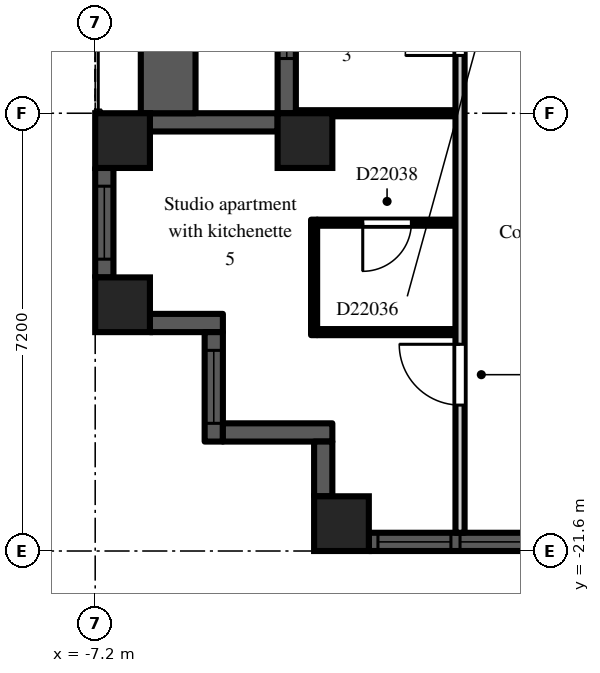
"""IFC4 building model, lengths in metres.
Left out: names, types, materials, properties, quantities, classifications, styles, units other than length and angle.
Written with IfcOpenShell. Run it as: python <this file> out.ifc"""

import sys

from ifc_helpers import new_model, si_unit, direction, frame, frame_2d, origin, origin_2d, place, context, subcontext, project, spatial, rectangle, extrude, element, fill, save


model = new_model("IFC4")
c1 = context("Model", 3, precision=1e-05, world=origin(), true_north=direction((0.0, 1.0)))
c2 = subcontext(c1, "Body", "Model", "MODEL_VIEW")
j1 = project(units=[si_unit("LENGTHUNIT", "METRE"), si_unit("PLANEANGLEUNIT", "RADIAN")], contexts=[c1])
p1 = place(None, origin())
s1 = spatial("IfcSite", under=j1, at=p1, CompositionType="ELEMENT")
p2 = place(p1, origin())
s2 = spatial("IfcBuilding", under=s1, at=p2, CompositionType="ELEMENT")
p3 = place(p2, frame((0.0, 0.0, 156.3)))
s3 = spatial("IfcBuildingStorey", under=s2, at=p3, CompositionType="ELEMENT", Elevation=156.3)
for number, where, z_axis, x_axis in (
    (1, (-6.75, -17.55, 0.0), (0.0, 0.0, 1.0), (1.0, 0.0, 0.0)),
    (2, (-6.75, -14.85, 0.0), (0.0, 0.0, 1.0), (1.0, 0.0, 0.0)),
    (3, (-3.75, -14.85, 0.0), (0.0, 0.0, 1.0), (1.0, 0.0, 0.0)),
    (4, (-3.15, -21.15, 0.0), (0.0, 0.0, 1.0), (1.0, 0.0, 0.0)),
):
    element("IfcColumn", number, at=place(p3, frame(where, z_axis=z_axis, x_axis=x_axis)), inside=s3, PredefinedType="COLUMN", context=c2, shape_type="SweptSolid", body=[
        extrude(rectangle(XDim=0.9, YDim=0.9, at=origin_2d()), origin(), (0.0, 0.0, 1.0), 3.0),
    ])
p4 = place(p3, frame((-4.05, -7.2, 0.0), z_axis=(0.0, 0.0, 1.0), x_axis=(0.0, -1.0, 0.0)))
e5 = element("IfcWall", 5, at=p4, inside=s3, PredefinedType="SOLIDWALL", context=c2, shape_type="SweptSolid", body=[
    extrude(rectangle(XDim=7.2, YDim=0.3, at=frame_2d((3.6, 0.0))), origin(), (0.0, 0.0, 1.0), 2.2),
])
p5 = place(p4, frame((3.0, 0.0, 0.0)))
e6 = element("IfcOpeningElement", 6, at=p5, cuts=e5, PredefinedType="OPENING", context=c2, shape_type="SweptSolid", body=[
    extrude(rectangle(XDim=1.2, YDim=2.05, at=frame_2d((0.6, 1.025))), frame((0.0, 0.16, 0.0), z_axis=(0.0, -1.0, 0.0), x_axis=(1.0, 0.0, 0.0)), (0.0, 0.0, 1.0), 0.32),
])
p6 = place(p4, frame((0.9, 0.0, 0.2)))
e7 = element("IfcOpeningElement", 7, at=p6, cuts=e5, PredefinedType="OPENING", context=c2, shape_type="SweptSolid", body=[
    extrude(rectangle(XDim=1.8, YDim=1.85, at=frame_2d((0.9, 0.925))), frame((0.0, 0.16, 0.0), z_axis=(0.0, -1.0, 0.0), x_axis=(1.0, 0.0, 0.0)), (0.0, 0.0, 1.0), 0.32),
])
p7 = place(p4, frame((4.5, 0.0, 0.2)))
e8 = element("IfcOpeningElement", 8, at=p7, cuts=e5, PredefinedType="OPENING", context=c2, shape_type="SweptSolid", body=[
    extrude(rectangle(XDim=1.8, YDim=1.85, at=frame_2d((0.9, 0.925))), frame((0.0, 0.16, 0.0), z_axis=(0.0, -1.0, 0.0), x_axis=(1.0, 0.0, 0.0)), (0.0, 0.0, 1.0), 0.32),
])
p8 = place(p3, frame((-4.2, -14.55, 0.0), z_axis=(0.0, 0.0, 1.0), x_axis=(-1.0, 0.0, 0.0)))
e9 = element("IfcWall", 9, at=p8, inside=s3, PredefinedType="SOLIDWALL", context=c2, shape_type="SweptSolid", body=[
    extrude(rectangle(XDim=2.1, YDim=0.3, at=frame_2d((1.05, 0.0))), origin(), (0.0, 0.0, 1.0), 2.2),
])
p9 = place(p3, frame((-7.05, -15.3, 0.0), z_axis=(0.0, 0.0, 1.0), x_axis=(0.0, -1.0, 0.0)))
e10 = element("IfcWall", 10, at=p9, inside=s3, PredefinedType="SOLIDWALL", context=c2, shape_type="SweptSolid", body=[
    extrude(rectangle(XDim=1.8, YDim=0.3, at=frame_2d((0.9, 0.0))), origin(), (0.0, 0.0, 1.0), 2.2),
])
p10 = place(p9, frame((0.3, 0.0, 0.2)))
e11 = element("IfcOpeningElement", 11, at=p10, cuts=e10, PredefinedType="OPENING", context=c2, shape_type="SweptSolid", body=[
    extrude(rectangle(XDim=1.2, YDim=1.85, at=frame_2d((0.6, 0.925))), frame((0.0, 0.16, 0.0), z_axis=(0.0, -1.0, 0.0), x_axis=(1.0, 0.0, 0.0)), (0.0, 0.0, 1.0), 0.32),
])
p11 = place(p3, frame((-6.3, -17.85, 0.0), z_axis=(0.0, 0.0, 1.0), x_axis=(1.0, 0.0, 0.0)))
e12 = element("IfcWall", 12, at=p11, inside=s3, PredefinedType="SOLIDWALL", context=c2, shape_type="SweptSolid", body=[
    extrude(rectangle(XDim=1.2, YDim=0.3, at=frame_2d((0.6, 0.0))), origin(), (0.0, 0.0, 1.0), 2.6),
])
p12 = place(p3, frame((-5.25, -18.0, 0.0), z_axis=(0.0, 0.0, 1.0), x_axis=(0.0, -1.0, 0.0)))
e13 = element("IfcWall", 13, at=p12, inside=s3, PredefinedType="SOLIDWALL", context=c2, shape_type="SweptSolid", body=[
    extrude(rectangle(XDim=1.8, YDim=0.3, at=frame_2d((0.9, 0.0))), origin(), (0.0, 0.0, 1.0), 2.6),
])
p13 = place(p12, frame((0.3, 0.0, 0.2)))
e14 = element("IfcOpeningElement", 14, at=p13, cuts=e13, PredefinedType="OPENING", context=c2, shape_type="SweptSolid", body=[
    extrude(rectangle(XDim=1.2, YDim=1.85, at=frame_2d((0.6, 0.925))), frame((0.0, 0.16, 0.0), z_axis=(0.0, -1.0, 0.0), x_axis=(1.0, 0.0, 0.0)), (0.0, 0.0, 1.0), 0.32),
])
p14 = place(p3, frame((-5.1, -19.65, 0.0), z_axis=(0.0, 0.0, 1.0), x_axis=(1.0, 0.0, 0.0)))
e15 = element("IfcWall", 15, at=p14, inside=s3, PredefinedType="SOLIDWALL", context=c2, shape_type="SweptSolid", body=[
    extrude(rectangle(XDim=1.8, YDim=0.3, at=frame_2d((0.9, 0.0))), origin(), (0.0, 0.0, 1.0), 2.6),
])
p15 = place(p3, frame((-3.45, -19.8, 0.0), z_axis=(0.0, 0.0, 1.0), x_axis=(0.0, -1.0, 0.0)))
e16 = element("IfcWall", 16, at=p15, inside=s3, PredefinedType="SOLIDWALL", context=c2, shape_type="SweptSolid", body=[
    extrude(rectangle(XDim=0.9, YDim=0.3, at=frame_2d((0.45, 0.0))), origin(), (0.0, 0.0, 1.0), 2.6),
])
p16 = place(p3, frame((-2.7, -21.45, 0.0), z_axis=(0.0, 0.0, 1.0), x_axis=(1.0, 0.0, 0.0)))
e17 = element("IfcWall", 17, at=p16, inside=s3, PredefinedType="SOLIDWALL", context=c2, shape_type="SweptSolid", body=[
    extrude(rectangle(XDim=5.4, YDim=0.3, at=frame_2d((2.7, 0.0))), origin(), (0.0, 0.0, 1.0), 2.2),
])
p17 = place(p16, frame((1.5, 0.0, 0.2)))
e18 = element("IfcOpeningElement", 18, at=p17, cuts=e17, PredefinedType="OPENING", context=c2, shape_type="SweptSolid", body=[
    extrude(rectangle(XDim=2.4, YDim=1.85, at=frame_2d((1.2, 0.925))), frame((0.0, 0.16, 0.0), z_axis=(0.0, -1.0, 0.0), x_axis=(1.0, 0.0, 0.0)), (0.0, 0.0, 1.0), 0.32),
])
p18 = place(p16, frame((0.15, 0.0, 0.2)))
e19 = element("IfcOpeningElement", 19, at=p18, cuts=e17, PredefinedType="OPENING", context=c2, shape_type="SweptSolid", body=[
    extrude(rectangle(XDim=1.2, YDim=1.85, at=frame_2d((0.6, 0.925))), frame((0.0, 0.16, 0.0), z_axis=(0.0, -1.0, 0.0), x_axis=(1.0, 0.0, 0.0)), (0.0, 0.0, 1.0), 0.32),
])
p19 = place(p16, frame((4.05, 0.0, 0.2)))
e20 = element("IfcOpeningElement", 20, at=p19, cuts=e17, PredefinedType="OPENING", context=c2, shape_type="SweptSolid", body=[
    extrude(rectangle(XDim=1.2, YDim=1.85, at=frame_2d((0.6, 0.925))), frame((0.0, 0.16, 0.0), z_axis=(0.0, -1.0, 0.0), x_axis=(1.0, 0.0, 0.0)), (0.0, 0.0, 1.0), 0.32),
])
p20 = place(p3, frame((-6.0, -14.4, 0.0), z_axis=(0.0, 0.0, 1.0), x_axis=(0.0, 1.0, 0.0)))
e21 = element("IfcWall", 21, at=p20, inside=s3, PredefinedType="PARAPET", context=c2, shape_type="SweptSolid", body=[
    extrude(rectangle(XDim=7.2, YDim=0.9, at=frame_2d((3.6, 0.0))), origin(), (0.0, 0.0, 1.0), 0.8),
])
p21 = place(p3, frame((-3.9, -14.4, 0.0), z_axis=(0.0, 0.0, 1.0), x_axis=(1.0, 0.0, 0.0)))
e22 = element("IfcWall", 22, at=p21, inside=s3, PredefinedType="PARTITIONING", context=c2, shape_type="SweptSolid", body=[
    extrude(rectangle(XDim=2.625, YDim=0.1, at=frame_2d((1.312, 0.0))), origin(), (0.0, 0.0, 1.0), 2.6),
])
p22 = place(p3, frame((-3.6, -18.05, 0.0), z_axis=(0.0, 0.0, 1.0), x_axis=(0.0, 1.0, 0.0)))
e23 = element("IfcWall", 23, at=p22, inside=s3, PredefinedType="PARTITIONING", context=c2, shape_type="SweptSolid", body=[
    extrude(rectangle(XDim=1.9, YDim=0.1, at=frame_2d((0.95, 0.0))), origin(), (0.0, 0.0, 1.0), 2.6),
])
p23 = place(p3, frame((-3.55, -18.0, 0.0), z_axis=(0.0, 0.0, 1.0), x_axis=(1.0, 0.0, 0.0)))
e24 = element("IfcWall", 24, at=p23, inside=s3, PredefinedType="PARTITIONING", context=c2, shape_type="SweptSolid", body=[
    extrude(rectangle(XDim=2.275, YDim=0.1, at=frame_2d((1.138, 0.0))), origin(), (0.0, 0.0, 1.0), 2.6),
])
p24 = place(p3, frame((-3.55, -16.2, 0.0), z_axis=(0.0, 0.0, 1.0), x_axis=(1.0, 0.0, 0.0)))
e25 = element("IfcWall", 25, at=p24, inside=s3, PredefinedType="PARTITIONING", context=c2, shape_type="SweptSolid", body=[
    extrude(rectangle(XDim=2.275, YDim=0.1, at=frame_2d((1.138, 0.0))), origin(), (0.0, 0.0, 1.0), 2.6),
])
p25 = place(p24, frame((0.75, 0.0, 0.0)))
e26 = element("IfcOpeningElement", 26, at=p25, cuts=e25, PredefinedType="OPENING", context=c2, shape_type="SweptSolid", body=[
    extrude(rectangle(XDim=0.8, YDim=2.1, at=frame_2d((0.4, 1.05))), frame((0.0, 0.06, 0.0), z_axis=(0.0, -1.0, 0.0), x_axis=(1.0, 0.0, 0.0)), (0.0, 0.0, 1.0), 0.12),
])
p26 = place(p3, frame((-1.2, -21.3, 0.0), z_axis=(0.0, 0.0, 1.0), x_axis=(0.0, 1.0, 0.0)))
e27 = element("IfcWall", 27, at=p26, inside=s3, PredefinedType="PARTITIONING", context=c2, shape_type="SweptSolid", body=[
    extrude(rectangle(XDim=14.025, YDim=0.15, at=frame_2d((7.013, 0.0))), origin(), (0.0, 0.0, 1.0), 2.6),
])
p27 = place(p26, frame((7.85, 0.0, 0.0)))
e28 = element("IfcOpeningElement", 28, at=p27, cuts=e27, PredefinedType="OPENING", context=c2, shape_type="SweptSolid", body=[
    extrude(rectangle(XDim=0.9, YDim=2.1, at=frame_2d((0.45, 1.05))), frame((0.0, 0.085, 0.0), z_axis=(0.0, -1.0, 0.0), x_axis=(1.0, 0.0, 0.0)), (0.0, 0.0, 1.0), 0.17),
])
p28 = place(p26, frame((11.45, 0.0, 0.0)))
e29 = element("IfcOpeningElement", 29, at=p28, cuts=e27, PredefinedType="OPENING", context=c2, shape_type="SweptSolid", body=[
    extrude(rectangle(XDim=0.9, YDim=2.1, at=frame_2d((0.45, 1.05))), frame((0.0, 0.085, 0.0), z_axis=(0.0, -1.0, 0.0), x_axis=(1.0, 0.0, 0.0)), (0.0, 0.0, 1.0), 0.17),
])
p29 = place(p26, frame((2.1, 0.0, 0.0)))
e30 = element("IfcOpeningElement", 30, at=p29, cuts=e27, PredefinedType="OPENING", context=c2, shape_type="SweptSolid", body=[
    extrude(rectangle(XDim=1.0, YDim=2.1, at=frame_2d((0.5, 1.05))), frame((0.0, 0.085, 0.0), z_axis=(0.0, -1.0, 0.0), x_axis=(1.0, 0.0, 0.0)), (0.0, 0.0, 1.0), 0.17),
])
p30 = place(p7, origin())
e31 = element("IfcWindow", 31, at=p30, inside=s3, PartitioningType="SINGLE_PANEL", PredefinedType="WINDOW", context=c2, shape_type="SweptSolid", body=[
    extrude(rectangle(XDim=1.8, YDim=1.85, at=frame_2d((0.9, 0.925))), frame((0.0, 0.03, 0.0), z_axis=(0.0, -1.0, 0.0), x_axis=(1.0, 0.0, 0.0)), (0.0, 0.0, 1.0), 0.06),
])
fill(e8, e31)
p31 = place(p10, origin())
e32 = element("IfcWindow", 32, at=p31, inside=s3, PartitioningType="SINGLE_PANEL", PredefinedType="WINDOW", context=c2, shape_type="SweptSolid", body=[
    extrude(rectangle(XDim=1.2, YDim=1.85, at=frame_2d((0.6, 0.925))), frame((0.0, 0.03, 0.0), z_axis=(0.0, -1.0, 0.0), x_axis=(1.0, 0.0, 0.0)), (0.0, 0.0, 1.0), 0.06),
])
fill(e11, e32)
p32 = place(p13, origin())
e33 = element("IfcWindow", 33, at=p32, inside=s3, PartitioningType="SINGLE_PANEL", PredefinedType="WINDOW", context=c2, shape_type="SweptSolid", body=[
    extrude(rectangle(XDim=1.2, YDim=1.85, at=frame_2d((0.6, 0.925))), frame((0.0, 0.03, 0.0), z_axis=(0.0, -1.0, 0.0), x_axis=(1.0, 0.0, 0.0)), (0.0, 0.0, 1.0), 0.06),
])
fill(e14, e33)
p33 = place(p17, origin())
e34 = element("IfcWindow", 34, at=p33, inside=s3, PartitioningType="SINGLE_PANEL", PredefinedType="WINDOW", context=c2, shape_type="SweptSolid", body=[
    extrude(rectangle(XDim=2.4, YDim=1.85, at=frame_2d((1.2, 0.925))), frame((0.0, 0.03, 0.0), z_axis=(0.0, -1.0, 0.0), x_axis=(1.0, 0.0, 0.0)), (0.0, 0.0, 1.0), 0.06),
])
fill(e18, e34)
p34 = place(p18, origin())
e35 = element("IfcWindow", 35, at=p34, inside=s3, PartitioningType="SINGLE_PANEL", PredefinedType="WINDOW", context=c2, shape_type="SweptSolid", body=[
    extrude(rectangle(XDim=1.2, YDim=1.85, at=frame_2d((0.6, 0.925))), frame((0.0, 0.03, 0.0), z_axis=(0.0, -1.0, 0.0), x_axis=(1.0, 0.0, 0.0)), (0.0, 0.0, 1.0), 0.06),
])
fill(e19, e35)
p35 = place(p27, origin())
e36 = element("IfcDoor", 36, at=p35, inside=s3, OperationType="SINGLE_SWING_LEFT", PredefinedType="DOOR", context=c2, shape_type="SweptSolid", body=[
    extrude(rectangle(XDim=0.9, YDim=2.1, at=frame_2d((0.45, 1.05))), frame((0.0, 0.025, 0.0), z_axis=(0.0, -1.0, 0.0), x_axis=(1.0, 0.0, 0.0)), (0.0, 0.0, 1.0), 0.05),
])
fill(e28, e36)
p36 = place(p25, frame((0.8, 0.0, 0.0), z_axis=(0.0, 0.0, 1.0), x_axis=(-1.0, 0.0, 0.0)))
e37 = element("IfcDoor", 37, at=p36, inside=s3, OperationType="SINGLE_SWING_RIGHT", PredefinedType="DOOR", context=c2, shape_type="SweptSolid", body=[
    extrude(rectangle(XDim=0.8, YDim=2.1, at=frame_2d((0.4, 1.05))), frame((0.0, 0.025, 0.0), z_axis=(0.0, -1.0, 0.0), x_axis=(1.0, 0.0, 0.0)), (0.0, 0.0, 1.0), 0.05),
])
fill(e26, e37)
p37 = place(p29, origin())
e38 = element("IfcDoor", 38, at=p37, inside=s3, OperationType="SINGLE_SWING_RIGHT", PredefinedType="DOOR", context=c2, shape_type="SweptSolid", body=[
    extrude(rectangle(XDim=1.0, YDim=2.1, at=frame_2d((0.5, 1.05))), frame((0.0, 0.025, 0.0), z_axis=(0.0, -1.0, 0.0), x_axis=(1.0, 0.0, 0.0)), (0.0, 0.0, 1.0), 0.05),
])
fill(e30, e38)
save(model, sys.argv[1])
